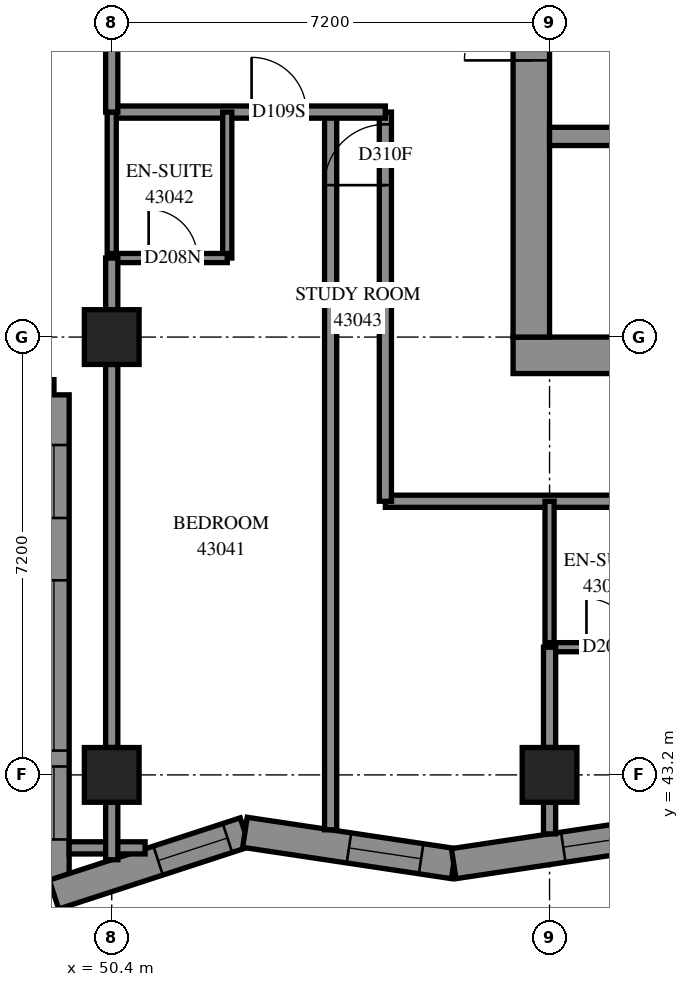
"""IFC4 building model, lengths in metres.
Left out: names, types, materials, properties, quantities, classifications, styles, units other than length and angle.
Written with IfcOpenShell. Run it as: python <this file> out.ifc"""

import sys

from ifc_helpers import new_model, si_unit, direction, frame, frame_2d, origin, origin_2d, place, context, subcontext, project, spatial, polyline, rectangle, outline, extrude, element, fill, save


model = new_model("IFC4")
c1 = context("Model", 3, precision=1e-05, world=origin(), true_north=direction((0.0, 1.0)))
c2 = subcontext(c1, "Body", "Model", "MODEL_VIEW")
j1 = project(units=[si_unit("LENGTHUNIT", "METRE"), si_unit("PLANEANGLEUNIT", "RADIAN")], contexts=[c1])
p1 = place(None, origin())
s1 = spatial("IfcSite", under=j1, at=p1, CompositionType="ELEMENT")
p2 = place(p1, origin())
s2 = spatial("IfcBuilding", under=s1, at=p2, CompositionType="ELEMENT")
p3 = place(p2, frame((0.0, 0.0, 159.2)))
s3 = spatial("IfcBuildingStorey", under=s2, at=p3, CompositionType="ELEMENT", Elevation=159.2)
for number, where, z_axis, x_axis in (
    (1, (50.4, 43.2, 0.0), (0.0, 0.0, 1.0), (1.0, 0.0, 0.0)),
    (2, (50.4, 50.4, 0.0), (0.0, 0.0, 1.0), (1.0, 0.0, 0.0)),
    (3, (57.6, 43.2, 0.0), (0.0, 0.0, 1.0), (1.0, 0.0, 0.0)),
):
    element("IfcColumn", number, at=place(p3, frame(where, z_axis=z_axis, x_axis=x_axis)), inside=s3, PredefinedType="COLUMN", context=c2, shape_type="SweptSolid", body=[
        extrude(rectangle(XDim=0.9, YDim=0.9, at=origin_2d()), origin(), (0.0, 0.0, 1.0), 3.1),
    ])
p4 = place(p3, frame((57.0, 50.1, -0.3), z_axis=(0.0, 0.0, 1.0), x_axis=(1.0, 0.0, 0.0)))
e4 = element("IfcWall", 4, at=p4, inside=s3, PredefinedType="SHEAR", context=c2, shape_type="SweptSolid", body=[
    extrude(rectangle(XDim=15.6, YDim=0.6, at=frame_2d((7.8, 0.0))), origin(), (0.0, 0.0, 1.0), 2.7),
])
p5 = place(p3, frame((57.3, 50.4, -0.3), z_axis=(0.0, 0.0, 1.0), x_axis=(0.0, 1.0, 0.0)))
e5 = element("IfcWall", 5, at=p5, inside=s3, PredefinedType="SHEAR", context=c2, shape_type="SweptSolid", body=[
    extrude(rectangle(XDim=14.4, YDim=0.6, at=frame_2d((7.2, 0.0))), origin(), (0.0, 0.0, 1.0), 2.7),
])
p6 = place(p5, frame((4.55, 0.0, 0.3)))
e6 = element("IfcOpeningElement", 6, at=p6, cuts=e5, PredefinedType="OPENING", context=c2, shape_type="SweptSolid", body=[
    extrude(rectangle(XDim=1.1, YDim=2.1, at=frame_2d((0.55, 1.05))), frame((0.0, 0.31, 0.0), z_axis=(0.0, -1.0, 0.0), x_axis=(1.0, 0.0, 0.0)), (0.0, 0.0, 1.0), 0.62),
])
p7 = place(p5, frame((11.35, 0.0, 0.3)))
e7 = element("IfcOpeningElement", 7, at=p7, cuts=e5, PredefinedType="OPENING", context=c2, shape_type="SweptSolid", body=[
    extrude(rectangle(XDim=1.1, YDim=2.1, at=frame_2d((0.55, 1.05))), frame((0.0, 0.31, 0.0), z_axis=(0.0, -1.0, 0.0), x_axis=(1.0, 0.0, 0.0)), (0.0, 0.0, 1.0), 0.62),
])
p8 = place(p3, frame((57.6, 53.7, 0.0), z_axis=(0.0, 0.0, 1.0), x_axis=(1.0, 0.0, 0.0)))
e8 = element("IfcWall", 8, at=p8, inside=s3, PredefinedType="SOLIDWALL", context=c2, shape_type="SweptSolid", body=[
    extrude(rectangle(XDim=14.4, YDim=0.3, at=frame_2d((7.2, 0.0))), origin(), (0.0, 0.0, 1.0), 3.1),
])
p9 = place(p8, frame((1.35, 0.0, 0.0)))
e9 = element("IfcOpeningElement", 9, at=p9, cuts=e8, PredefinedType="OPENING", context=c2, shape_type="SweptSolid", body=[
    extrude(rectangle(XDim=0.9, YDim=2.1, at=frame_2d((0.45, 1.05))), frame((0.0, 0.16, 0.0), z_axis=(0.0, -1.0, 0.0), x_axis=(1.0, 0.0, 0.0)), (0.0, 0.0, 1.0), 0.32),
])
p10 = place(p8, frame((4.95, 0.0, 0.0)))
e10 = element("IfcOpeningElement", 10, at=p10, cuts=e8, PredefinedType="OPENING", context=c2, shape_type="SweptSolid", body=[
    extrude(rectangle(XDim=0.9, YDim=2.1, at=frame_2d((0.45, 1.05))), frame((0.0, 0.16, 0.0), z_axis=(0.0, -1.0, 0.0), x_axis=(1.0, 0.0, 0.0)), (0.0, 0.0, 1.0), 0.32),
])
p11 = place(p8, frame((8.55, 0.0, 0.0)))
e11 = element("IfcOpeningElement", 11, at=p11, cuts=e8, PredefinedType="OPENING", context=c2, shape_type="SweptSolid", body=[
    extrude(rectangle(XDim=0.9, YDim=2.1, at=frame_2d((0.45, 1.05))), frame((0.0, 0.16, 0.0), z_axis=(0.0, -1.0, 0.0), x_axis=(1.0, 0.0, 0.0)), (0.0, 0.0, 1.0), 0.32),
])
p12 = place(p8, frame((12.05, 0.0, 0.0)))
e12 = element("IfcOpeningElement", 12, at=p12, cuts=e8, PredefinedType="OPENING", context=c2, shape_type="SweptSolid", body=[
    extrude(rectangle(XDim=1.1, YDim=2.1, at=frame_2d((0.55, 1.05))), frame((0.0, 0.16, 0.0), z_axis=(0.0, -1.0, 0.0), x_axis=(1.0, 0.0, 0.0)), (0.0, 0.0, 1.0), 0.32),
])
p13 = place(p3, frame((42.25, 49.45, 0.0), z_axis=(0.0, 0.0, 1.0), x_axis=(1.0, 0.0, 0.0)))
e13 = element("IfcWall", 13, at=p13, inside=s3, PredefinedType="SOLIDWALL", context=c2, shape_type="SweptSolid", body=[
    extrude(outline(polyline([(-0.25, -0.25), (6.95, -0.25), (7.45, 0.25), (0.25, 0.25), (-0.25, -0.25)])), origin(), (0.0, 0.0, 1.0), 3.1),
])
p14 = place(p13, frame((1.35, 0.0, 0.45)))
e14 = element("IfcOpeningElement", 14, at=p14, cuts=e13, PredefinedType="OPENING", context=c2, shape_type="SweptSolid", body=[
    extrude(rectangle(XDim=2.8, YDim=2.5, at=frame_2d((1.4, 1.25))), frame((0.0, 0.26, 0.0), z_axis=(0.0, -1.0, 0.0), x_axis=(1.0, 0.0, 0.0)), (0.0, 0.0, 1.0), 0.52),
])
p15 = place(p13, frame((5.175, 0.0, 0.45)))
e15 = element("IfcOpeningElement", 15, at=p15, cuts=e13, PredefinedType="OPENING", context=c2, shape_type="SweptSolid", body=[
    extrude(rectangle(XDim=1.2, YDim=2.5, at=frame_2d((0.6, 1.25))), frame((0.0, 0.26, 0.0), z_axis=(0.0, -1.0, 0.0), x_axis=(1.0, 0.0, 0.0)), (0.0, 0.0, 1.0), 0.52),
])
p16 = place(p3, frame((49.45, 49.45, 0.0), z_axis=(0.0, 0.0, 1.0), x_axis=(0.0, -1.0, 0.0)))
e16 = element("IfcWall", 16, at=p16, inside=s3, PredefinedType="SOLIDWALL", context=c2, shape_type="SweptSolid", body=[
    extrude(outline(polyline([(0.25, -0.25), (8.562, -0.25), (7.873, 0.25), (-0.25, 0.25), (0.25, -0.25)])), origin(), (0.0, 0.0, 1.0), 3.1),
])
p17 = place(p16, frame((3.05, 0.0, 0.45)))
e17 = element("IfcOpeningElement", 17, at=p17, cuts=e16, PredefinedType="OPENING", context=c2, shape_type="SweptSolid", body=[
    extrude(rectangle(XDim=2.8, YDim=2.5, at=frame_2d((1.4, 1.25))), frame((0.0, 0.26, 0.0), z_axis=(0.0, -1.0, 0.0), x_axis=(1.0, 0.0, 0.0)), (0.0, 0.0, 1.0), 0.52),
])
p18 = place(p16, frame((0.825, 0.0, 0.45)))
e18 = element("IfcOpeningElement", 18, at=p18, cuts=e16, PredefinedType="OPENING", context=c2, shape_type="SweptSolid", body=[
    extrude(rectangle(XDim=1.2, YDim=2.5, at=frame_2d((0.6, 1.25))), frame((0.0, 0.26, 0.0), z_axis=(0.0, -1.0, 0.0), x_axis=(1.0, 0.0, 0.0)), (0.0, 0.0, 1.0), 0.52),
])
p19 = place(p16, frame((6.112, 0.0, 0.45)))
e19 = element("IfcOpeningElement", 19, at=p19, cuts=e16, PredefinedType="OPENING", context=c2, shape_type="SweptSolid", body=[
    extrude(rectangle(XDim=1.2, YDim=2.5, at=frame_2d((0.6, 1.25))), frame((0.0, 0.26, 0.0), z_axis=(0.0, -1.0, 0.0), x_axis=(1.0, 0.0, 0.0)), (0.0, 0.0, 1.0), 0.52),
])
p20 = place(p3, frame((49.45, 41.232, 0.0), z_axis=(0.0, 0.0, 1.0), x_axis=(0.9507752204, 0.3098813971, 0.0)))
e20 = element("IfcWall", 20, at=p20, inside=s3, PredefinedType="SOLIDWALL", context=c2, shape_type="SweptSolid", body=[
    extrude(outline(polyline([(-0.344, -0.25), (3.244, -0.25), (3.362, 0.25), (0.344, 0.25), (-0.344, -0.25)])), origin(), (0.0, 0.0, 1.0), 3.1),
])
p21 = place(p20, frame((1.801, 0.0, 0.45)))
e21 = element("IfcOpeningElement", 21, at=p21, cuts=e20, PredefinedType="OPENING", context=c2, shape_type="SweptSolid", body=[
    extrude(rectangle(XDim=1.2, YDim=2.5, at=frame_2d((0.6, 1.25))), frame((0.0, 0.26, 0.0), z_axis=(0.0, -1.0, 0.0), x_axis=(1.0, 0.0, 0.0)), (0.0, 0.0, 1.0), 0.52),
])
p22 = place(p3, frame((52.591, 42.256, 0.0), z_axis=(0.0, 0.0, 1.0), x_axis=(0.9889270545, -0.1484024288, 0.0)))
e22 = element("IfcWall", 22, at=p22, inside=s3, PredefinedType="SOLIDWALL", context=c2, shape_type="SweptSolid", body=[
    extrude(outline(polyline([(0.059, -0.25), (3.509, -0.25), (3.434, 0.25), (-0.059, 0.25), (0.059, -0.25)])), origin(), (0.0, 0.0, 1.0), 3.1),
])
p23 = place(p22, frame((1.73, 0.0, 0.45)))
e23 = element("IfcOpeningElement", 23, at=p23, cuts=e22, PredefinedType="OPENING", context=c2, shape_type="SweptSolid", body=[
    extrude(rectangle(XDim=1.2, YDim=2.5, at=frame_2d((0.6, 1.25))), frame((0.0, 0.26, 0.0), z_axis=(0.0, -1.0, 0.0), x_axis=(1.0, 0.0, 0.0)), (0.0, 0.0, 1.0), 0.52),
])
p24 = place(p3, frame((56.024, 41.741, 0.0), z_axis=(0.0, 0.0, 1.0), x_axis=(0.9889272091, 0.1484013984, 0.0)))
e24 = element("IfcWall", 24, at=p24, inside=s3, PredefinedType="SOLIDWALL", context=c2, shape_type="SweptSolid", body=[
    extrude(outline(polyline([(-0.037, -0.25), (3.413, -0.25), (3.488, 0.25), (0.037, 0.25), (-0.037, -0.25)])), origin(), (0.0, 0.0, 1.0), 3.1),
])
p25 = place(p24, frame((1.822, 0.0, 0.45)))
e25 = element("IfcOpeningElement", 25, at=p25, cuts=e24, PredefinedType="OPENING", context=c2, shape_type="SweptSolid", body=[
    extrude(rectangle(XDim=1.2, YDim=2.5, at=frame_2d((0.6, 1.25))), frame((0.0, 0.26, 0.0), z_axis=(0.0, -1.0, 0.0), x_axis=(1.0, 0.0, 0.0)), (0.0, 0.0, 1.0), 0.52),
])
p26 = place(p3, frame((54.9, 47.7, 0.0), z_axis=(0.0, 0.0, 1.0), x_axis=(1.0, 0.0, 0.0)))
e26 = element("IfcWall", 26, at=p26, inside=s3, PredefinedType="PARTITIONING", context=c2, shape_type="SweptSolid", body=[
    extrude(rectangle(XDim=19.326, YDim=0.2, at=frame_2d((9.663, 0.0))), origin(), (0.0, 0.0, 1.0), 3.1),
])
p27 = place(p26, frame((6.599, 0.0, 0.0)))
e27 = element("IfcOpeningElement", 27, at=p27, cuts=e26, PredefinedType="OPENING", context=c2, shape_type="SweptSolid", body=[
    extrude(rectangle(XDim=0.9, YDim=2.1, at=frame_2d((0.45, 1.05))), frame((0.0, 0.11, 0.0), z_axis=(0.0, -1.0, 0.0), x_axis=(1.0, 0.0, 0.0)), (0.0, 0.0, 1.0), 0.22),
])
p28 = place(p26, frame((14.101, 0.0, 0.0)))
e28 = element("IfcOpeningElement", 28, at=p28, cuts=e26, PredefinedType="OPENING", context=c2, shape_type="SweptSolid", body=[
    extrude(rectangle(XDim=0.9, YDim=2.1, at=frame_2d((0.45, 1.05))), frame((0.0, 0.11, 0.0), z_axis=(0.0, -1.0, 0.0), x_axis=(1.0, 0.0, 0.0)), (0.0, 0.0, 1.0), 0.22),
])
p29 = place(p3, frame((54.0, 42.297, 0.0), z_axis=(0.0, 0.0, 1.0), x_axis=(0.0, 1.0, 0.0)))
e29 = element("IfcWall", 29, at=p29, inside=s3, PredefinedType="PARTITIONING", context=c2, shape_type="SweptSolid", body=[
    extrude(rectangle(XDim=11.803, YDim=0.2, at=frame_2d((5.901, 0.0))), origin(), (0.0, 0.0, 1.0), 3.1),
])
p30 = place(p3, frame((54.9, 47.7, 0.0), z_axis=(0.0, 0.0, 1.0), x_axis=(0.0, 1.0, 0.0)))
e30 = element("IfcWall", 30, at=p30, inside=s3, PredefinedType="PARTITIONING", context=c2, shape_type="SweptSolid", body=[
    extrude(rectangle(XDim=6.4, YDim=0.2, at=frame_2d((3.2, 0.0))), origin(), (0.0, 0.0, 1.0), 3.1),
])
p31 = place(p30, frame((5.199, 0.0, 0.0)))
e31 = element("IfcOpeningElement", 31, at=p31, cuts=e30, PredefinedType="OPENING", context=c2, shape_type="SweptSolid", body=[
    extrude(rectangle(XDim=1.0, YDim=2.1, at=frame_2d((0.5, 1.05))), frame((0.0, 0.11, 0.0), z_axis=(0.0, -1.0, 0.0), x_axis=(1.0, 0.0, 0.0)), (0.0, 0.0, 1.0), 0.22),
])
p32 = place(p3, frame((50.4, 43.65, 0.0), z_axis=(0.0, 0.0, 1.0), x_axis=(0.0, 1.0, 0.0)))
e32 = element("IfcWall", 32, at=p32, inside=s3, PredefinedType="PARTITIONING", context=c2, shape_type="SweptSolid", body=[
    extrude(rectangle(XDim=6.3, YDim=0.2, at=frame_2d((3.15, 0.0))), origin(), (0.0, 0.0, 1.0), 2.6),
])
p33 = place(p3, frame((50.4, 54.1, 0.0), z_axis=(0.0, 0.0, 1.0), x_axis=(1.0, 0.0, 0.0)))
e33 = element("IfcWall", 33, at=p33, inside=s3, PredefinedType="PARTITIONING", context=c2, shape_type="SweptSolid", body=[
    extrude(rectangle(XDim=4.5, YDim=0.2, at=frame_2d((2.25, 0.0))), origin(), (0.0, 0.0, 1.0), 3.1),
])
p34 = place(p33, frame((2.3, 0.0, 0.0)))
e34 = element("IfcOpeningElement", 34, at=p34, cuts=e33, PredefinedType="OPENING", context=c2, shape_type="SweptSolid", body=[
    extrude(rectangle(XDim=0.9, YDim=2.1, at=frame_2d((0.45, 1.05))), frame((0.0, 0.11, 0.0), z_axis=(0.0, -1.0, 0.0), x_axis=(1.0, 0.0, 0.0)), (0.0, 0.0, 1.0), 0.22),
])
for number, where, z_axis, x_axis in (
    (35, (57.6, 45.3, 0.0), (0.0, 0.0, 1.0), (0.0, 1.0, 0.0)),
    (36, (52.3, 51.7, 0.0), (0.0, 0.0, 1.0), (0.0, 1.0, 0.0)),
    (37, (50.4, 51.7, 0.0), (0.0, 0.0, 1.0), (0.0, 1.0, 0.0)),
):
    element("IfcWall", number, at=place(p3, frame(where, z_axis=z_axis, x_axis=x_axis)), inside=s3, PredefinedType="PARTITIONING", context=c2, shape_type="SweptSolid", body=[
        extrude(rectangle(XDim=2.4, YDim=0.15, at=frame_2d((1.2, 0.0))), origin(), (0.0, 0.0, 1.0), 3.1),
    ])
p35 = place(p3, frame((50.4, 54.1, 0.0), z_axis=(0.0, 0.0, 1.0), x_axis=(0.0, 1.0, 0.0)))
e38 = element("IfcWall", 38, at=p35, inside=s3, PredefinedType="PARTITIONING", context=c2, shape_type="SweptSolid", body=[
    extrude(rectangle(XDim=2.2, YDim=0.2, at=frame_2d((1.1, 0.0))), origin(), (0.0, 0.0, 1.0), 3.1),
])
p36 = place(p3, frame((50.4, 51.7, 0.0), z_axis=(0.0, 0.0, 1.0), x_axis=(1.0, 0.0, 0.0)))
e39 = element("IfcWall", 39, at=p36, inside=s3, PredefinedType="PARTITIONING", context=c2, shape_type="SweptSolid", body=[
    extrude(rectangle(XDim=1.9, YDim=0.15, at=frame_2d((0.95, 0.0))), origin(), (0.0, 0.0, 1.0), 3.1),
])
p37 = place(p36, frame((0.607, 0.0, 0.0)))
e40 = element("IfcOpeningElement", 40, at=p37, cuts=e39, PredefinedType="OPENING", context=c2, shape_type="SweptSolid", body=[
    extrude(rectangle(XDim=0.8, YDim=2.1, at=frame_2d((0.4, 1.05))), frame((0.0, 0.085, 0.0), z_axis=(0.0, -1.0, 0.0), x_axis=(1.0, 0.0, 0.0)), (0.0, 0.0, 1.0), 0.17),
])
p38 = place(p3, frame((57.6, 45.3, 0.0), z_axis=(0.0, 0.0, 1.0), x_axis=(1.0, 0.0, 0.0)))
e41 = element("IfcWall", 41, at=p38, inside=s3, PredefinedType="PARTITIONING", context=c2, shape_type="SweptSolid", body=[
    extrude(rectangle(XDim=1.9, YDim=0.15, at=frame_2d((0.95, 0.0))), origin(), (0.0, 0.0, 1.0), 3.1),
])
p39 = place(p38, frame((0.607, 0.0, 0.0)))
e42 = element("IfcOpeningElement", 42, at=p39, cuts=e41, PredefinedType="OPENING", context=c2, shape_type="SweptSolid", body=[
    extrude(rectangle(XDim=0.8, YDim=2.1, at=frame_2d((0.4, 1.05))), frame((0.0, 0.085, 0.0), z_axis=(0.0, -1.0, 0.0), x_axis=(1.0, 0.0, 0.0)), (0.0, 0.0, 1.0), 0.17),
])
p40 = place(p3, frame((57.6, 43.65, 0.0), z_axis=(0.0, 0.0, 1.0), x_axis=(0.0, 1.0, 0.0)))
e43 = element("IfcWall", 43, at=p40, inside=s3, PredefinedType="PARTITIONING", context=c2, shape_type="SweptSolid", body=[
    extrude(rectangle(XDim=1.65, YDim=0.2, at=frame_2d((0.825, 0.0))), origin(), (0.0, 0.0, 1.0), 3.1),
])
p41 = place(p3, frame((49.7, 42.0, 0.0), z_axis=(0.0, 0.0, 1.0), x_axis=(1.0, 0.0, 0.0)))
e44 = element("IfcWall", 44, at=p41, inside=s3, PredefinedType="PARTITIONING", context=c2, shape_type="SweptSolid", body=[
    extrude(rectangle(XDim=1.248, YDim=0.2, at=frame_2d((0.624, 0.0))), origin(), (0.0, 0.0, 1.0), 3.1),
])
p42 = place(p3, frame((50.4, 50.85, 0.0), z_axis=(0.0, 0.0, 1.0), x_axis=(0.0, 1.0, 0.0)))
e45 = element("IfcWall", 45, at=p42, inside=s3, PredefinedType="PARTITIONING", context=c2, shape_type="SweptSolid", body=[
    extrude(rectangle(XDim=0.85, YDim=0.2, at=frame_2d((0.425, 0.0))), origin(), (0.0, 0.0, 1.0), 3.1),
])
p43 = place(p3, frame((50.4, 41.805, 0.0), z_axis=(0.0, 0.0, 1.0), x_axis=(0.0, 1.0, 0.0)))
e46 = element("IfcWall", 46, at=p43, inside=s3, PredefinedType="PARTITIONING", context=c2, shape_type="SweptSolid", body=[
    extrude(rectangle(XDim=0.945, YDim=0.2, at=frame_2d((0.472, 0.0))), origin(), (0.0, 0.0, 1.0), 3.1),
])
p44 = place(p3, frame((57.6, 42.23, 0.0), z_axis=(0.0, 0.0, 1.0), x_axis=(0.0, 1.0, 0.0)))
e47 = element("IfcWall", 47, at=p44, inside=s3, PredefinedType="PARTITIONING", context=c2, shape_type="SweptSolid", body=[
    extrude(rectangle(XDim=0.52, YDim=0.2, at=frame_2d((0.26, 0.0))), origin(), (0.0, 0.0, 1.0), 3.1),
])
p45 = place(p17, origin())
e48 = element("IfcWindow", 48, at=p45, inside=s3, PartitioningType="SINGLE_PANEL", PredefinedType="WINDOW", context=c2, shape_type="SweptSolid", body=[
    extrude(rectangle(XDim=2.8, YDim=2.5, at=frame_2d((1.4, 1.25))), frame((0.0, 0.18, 0.0), z_axis=(0.0, -1.0, 0.0), x_axis=(1.0, 0.0, 0.0)), (0.0, 0.0, 1.0), 0.06),
])
fill(e17, e48)
p46 = place(p18, origin())
e49 = element("IfcWindow", 49, at=p46, inside=s3, PartitioningType="SINGLE_PANEL", PredefinedType="WINDOW", context=c2, shape_type="SweptSolid", body=[
    extrude(rectangle(XDim=1.2, YDim=2.5, at=frame_2d((0.6, 1.25))), frame((0.0, 0.18, 0.0), z_axis=(0.0, -1.0, 0.0), x_axis=(1.0, 0.0, 0.0)), (0.0, 0.0, 1.0), 0.06),
])
fill(e18, e49)
p47 = place(p19, origin())
e50 = element("IfcWindow", 50, at=p47, inside=s3, PartitioningType="SINGLE_PANEL", PredefinedType="WINDOW", context=c2, shape_type="SweptSolid", body=[
    extrude(rectangle(XDim=1.2, YDim=2.5, at=frame_2d((0.6, 1.25))), frame((0.0, 0.18, 0.0), z_axis=(0.0, -1.0, 0.0), x_axis=(1.0, 0.0, 0.0)), (0.0, 0.0, 1.0), 0.06),
])
fill(e19, e50)
p48 = place(p21, origin())
e51 = element("IfcWindow", 51, at=p48, inside=s3, PartitioningType="SINGLE_PANEL", PredefinedType="WINDOW", context=c2, shape_type="SweptSolid", body=[
    extrude(rectangle(XDim=1.2, YDim=2.5, at=frame_2d((0.6, 1.25))), frame((0.0, 0.18, 0.0), z_axis=(0.0, -1.0, 0.0), x_axis=(1.0, 0.0, 0.0)), (0.0, 0.0, 1.0), 0.06),
])
fill(e21, e51)
p49 = place(p23, origin())
e52 = element("IfcWindow", 52, at=p49, inside=s3, PartitioningType="SINGLE_PANEL", PredefinedType="WINDOW", context=c2, shape_type="SweptSolid", body=[
    extrude(rectangle(XDim=1.2, YDim=2.5, at=frame_2d((0.6, 1.25))), frame((0.0, 0.18, 0.0), z_axis=(0.0, -1.0, 0.0), x_axis=(1.0, 0.0, 0.0)), (0.0, 0.0, 1.0), 0.06),
])
fill(e23, e52)
p50 = place(p25, origin())
e53 = element("IfcWindow", 53, at=p50, inside=s3, PartitioningType="SINGLE_PANEL", PredefinedType="WINDOW", context=c2, shape_type="SweptSolid", body=[
    extrude(rectangle(XDim=1.2, YDim=2.5, at=frame_2d((0.6, 1.25))), frame((0.0, 0.18, 0.0), z_axis=(0.0, -1.0, 0.0), x_axis=(1.0, 0.0, 0.0)), (0.0, 0.0, 1.0), 0.06),
])
fill(e25, e53)
p51 = place(p6, origin())
e54 = element("IfcDoor", 54, at=p51, inside=s3, OperationType="DOUBLE_DOOR_SINGLE_SWING", PredefinedType="DOOR", context=c2, shape_type="SweptSolid", body=[
    extrude(rectangle(XDim=1.1, YDim=2.1, at=frame_2d((0.55, 1.05))), frame((0.0, 0.025, 0.0), z_axis=(0.0, -1.0, 0.0), x_axis=(1.0, 0.0, 0.0)), (0.0, 0.0, 1.0), 0.05),
])
fill(e6, e54)
p52 = place(p34, origin())
e55 = element("IfcDoor", 55, at=p52, inside=s3, OperationType="SINGLE_SWING_LEFT", PredefinedType="DOOR", context=c2, shape_type="SweptSolid", body=[
    extrude(rectangle(XDim=0.9, YDim=2.1, at=frame_2d((0.45, 1.05))), frame((0.0, 0.025, 0.0), z_axis=(0.0, -1.0, 0.0), x_axis=(1.0, 0.0, 0.0)), (0.0, 0.0, 1.0), 0.05),
])
fill(e34, e55)
p53 = place(p37, origin())
e56 = element("IfcDoor", 56, at=p53, inside=s3, OperationType="SINGLE_SWING_RIGHT", PredefinedType="DOOR", context=c2, shape_type="SweptSolid", body=[
    extrude(rectangle(XDim=0.8, YDim=2.1, at=frame_2d((0.4, 1.05))), frame((0.0, 0.025, 0.0), z_axis=(0.0, -1.0, 0.0), x_axis=(1.0, 0.0, 0.0)), (0.0, 0.0, 1.0), 0.05),
])
fill(e40, e56)
p54 = place(p31, origin())
e57 = element("IfcDoor", 57, at=p54, inside=s3, OperationType="SINGLE_SWING_RIGHT", PredefinedType="DOOR", context=c2, shape_type="SweptSolid", body=[
    extrude(rectangle(XDim=1.0, YDim=2.1, at=frame_2d((0.5, 1.05))), frame((0.0, 0.025, 0.0), z_axis=(0.0, -1.0, 0.0), x_axis=(1.0, 0.0, 0.0)), (0.0, 0.0, 1.0), 0.05),
])
fill(e31, e57)
p55 = place(p39, origin())
e58 = element("IfcDoor", 58, at=p55, inside=s3, OperationType="SINGLE_SWING_RIGHT", PredefinedType="DOOR", context=c2, shape_type="SweptSolid", body=[
    extrude(rectangle(XDim=0.8, YDim=2.1, at=frame_2d((0.4, 1.05))), frame((0.0, 0.025, 0.0), z_axis=(0.0, -1.0, 0.0), x_axis=(1.0, 0.0, 0.0)), (0.0, 0.0, 1.0), 0.05),
])
fill(e42, e58)
save(model, sys.argv[1])
